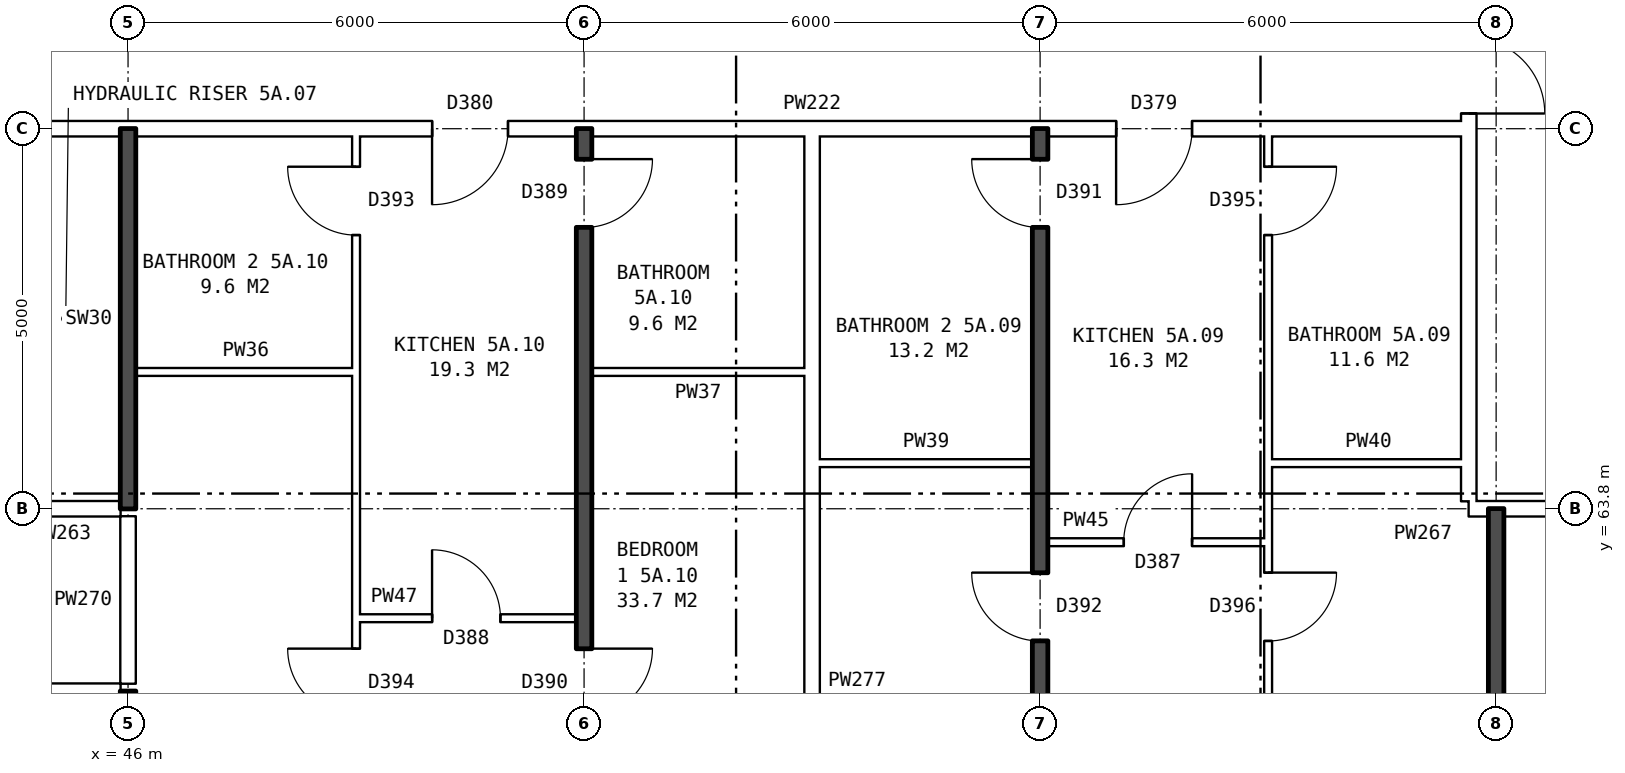
"""IFC4 building model, lengths in metres.
Left out: names, types, materials, properties, quantities, classifications, styles, units other than length and angle.
Written with IfcOpenShell. Run it as: python <this file> out.ifc"""

import sys

from ifc_helpers import new_model, si_unit, direction, frame, frame_2d, origin, place, context, subcontext, project, spatial, rectangle, extrude, element, fill, save


model = new_model("IFC4")
c1 = context("Model", 3, precision=1e-05, world=origin(), true_north=direction((0.0, 1.0)))
c2 = subcontext(c1, "Body", "Model", "MODEL_VIEW")
j1 = project(units=[si_unit("LENGTHUNIT", "METRE"), si_unit("PLANEANGLEUNIT", "RADIAN")], contexts=[c1])
p1 = place(None, origin())
s1 = spatial("IfcSite", under=j1, at=p1, CompositionType="ELEMENT")
p2 = place(p1, origin())
s2 = spatial("IfcBuilding", under=s1, at=p2, CompositionType="ELEMENT")
p3 = place(p2, frame((0.0, 0.0, 22.6)))
s3 = spatial("IfcBuildingStorey", under=s2, at=p3, CompositionType="ELEMENT", Elevation=22.6)
p4 = place(p3, frame((63.64, 63.9, 0.0), z_axis=(0.0, 0.0, 1.0), x_axis=(0.0, 1.0, 0.0)))
e1 = element("IfcWall", 1, at=p4, inside=s3, PredefinedType="PARTITIONING", context=c2, shape_type="SweptSolid", body=[
    extrude(rectangle(XDim=12.2, YDim=0.2, at=frame_2d((6.1, 0.0))), origin(), (0.0, 0.0, 1.0), 2.85),
])
p5 = place(p4, frame((5.1, 0.0, 0.0)))
e2 = element("IfcOpeningElement", 2, at=p5, cuts=e1, PredefinedType="OPENING", context=c2, shape_type="SweptSolid", body=[
    extrude(rectangle(XDim=2.0, YDim=2.1, at=frame_2d((1.0, 1.05))), frame((0.0, 0.11, 0.0), z_axis=(0.0, -1.0, 0.0), x_axis=(1.0, 0.0, 0.0)), (0.0, 0.0, 1.0), 0.22),
])
p6 = place(p3, frame((20.11, 61.4, 0.0), z_axis=(0.0, 0.0, 1.0), x_axis=(1.0, 0.0, 0.0)))
e3 = element("IfcWall", 3, at=p6, inside=s3, PredefinedType="PARTITIONING", context=c2, shape_type="SweptSolid", body=[
    extrude(rectangle(XDim=25.79, YDim=0.2, at=frame_2d((12.895, 0.0))), origin(), (0.0, 0.0, 1.0), 2.85),
])
p7 = place(p6, frame((22.34, 0.0, 0.0)))
e4 = element("IfcOpeningElement", 4, at=p7, cuts=e3, PredefinedType="OPENING", context=c2, shape_type="SweptSolid", body=[
    extrude(rectangle(XDim=1.0, YDim=2.1, at=frame_2d((0.5, 1.05))), frame((0.0, 0.11, 0.0), z_axis=(0.0, -1.0, 0.0), x_axis=(1.0, 0.0, 0.0)), (0.0, 0.0, 1.0), 0.22),
])
p8 = place(p6, frame((10.39, 0.0, 0.0)))
e5 = element("IfcOpeningElement", 5, at=p8, cuts=e3, PredefinedType="OPENING", context=c2, shape_type="SweptSolid", body=[
    extrude(rectangle(XDim=1.0, YDim=2.1, at=frame_2d((0.5, 1.05))), frame((0.0, 0.11, 0.0), z_axis=(0.0, -1.0, 0.0), x_axis=(1.0, 0.0, 0.0)), (0.0, 0.0, 1.0), 0.22),
])
p9 = place(p6, frame((2.245, 0.0, 0.0)))
e6 = element("IfcOpeningElement", 6, at=p9, cuts=e3, PredefinedType="OPENING", context=c2, shape_type="SweptSolid", body=[
    extrude(rectangle(XDim=1.0, YDim=2.1, at=frame_2d((0.5, 1.05))), frame((0.0, 0.11, 0.0), z_axis=(0.0, -1.0, 0.0), x_axis=(1.0, 0.0, 0.0)), (0.0, 0.0, 1.0), 0.22),
])
p10 = place(p3, frame((49.0, 62.36, 0.0), z_axis=(0.0, 0.0, 1.0), x_axis=(1.0, 0.0, 0.0)))
e7 = element("IfcWall", 7, at=p10, inside=s3, PredefinedType="PARTITIONING", context=c2, shape_type="SweptSolid", body=[
    extrude(rectangle(XDim=2.9, YDim=0.1, at=frame_2d((1.45, 0.0))), origin(), (0.0, 0.0, 1.0), 2.85),
])
p11 = place(p10, frame((1.0, 0.0, 0.0)))
e8 = element("IfcOpeningElement", 8, at=p11, cuts=e7, PredefinedType="OPENING", context=c2, shape_type="SweptSolid", body=[
    extrude(rectangle(XDim=0.9, YDim=2.1, at=frame_2d((0.45, 1.05))), frame((0.0, 0.06, 0.0), z_axis=(0.0, -1.0, 0.0), x_axis=(1.0, 0.0, 0.0)), (0.0, 0.0, 1.0), 0.12),
])
p12 = place(p3, frame((58.1, 63.36, 0.0), z_axis=(0.0, 0.0, 1.0), x_axis=(1.0, 0.0, 0.0)))
e9 = element("IfcWall", 9, at=p12, inside=s3, PredefinedType="PARTITIONING", context=c2, shape_type="SweptSolid", body=[
    extrude(rectangle(XDim=2.9, YDim=0.1, at=frame_2d((1.45, 0.0))), origin(), (0.0, 0.0, 1.0), 2.85),
])
p13 = place(p12, frame((1.0, 0.0, 0.0)))
e10 = element("IfcOpeningElement", 10, at=p13, cuts=e9, PredefinedType="OPENING", context=c2, shape_type="SweptSolid", body=[
    extrude(rectangle(XDim=0.9, YDim=2.1, at=frame_2d((0.45, 1.05))), frame((0.0, 0.06, 0.0), z_axis=(0.0, -1.0, 0.0), x_axis=(1.0, 0.0, 0.0)), (0.0, 0.0, 1.0), 0.12),
])
p14 = place(p3, frame((44.36, 63.8, 0.0), z_axis=(0.0, 0.0, 1.0), x_axis=(1.0, 0.0, 0.0)))
e11 = element("IfcWall", 11, at=p14, inside=s3, PredefinedType="PARTITIONING", context=c2, shape_type="SweptSolid", body=[
    extrude(rectangle(XDim=1.54, YDim=0.2, at=frame_2d((0.77, 0.0))), origin(), (0.0, 0.0, 1.0), 2.85),
])
p15 = place(p3, frame((63.64, 63.8, 0.0), z_axis=(0.0, 0.0, 1.0), x_axis=(1.0, 0.0, 0.0)))
e12 = element("IfcWall", 12, at=p15, inside=s3, PredefinedType="PARTITIONING", context=c2, shape_type="SweptSolid", body=[
    extrude(rectangle(XDim=3.0, YDim=0.2, at=frame_2d((1.5, 0.0))), origin(), (0.0, 0.0, 1.0), 2.85),
])
p16 = place(p15, frame((1.18, 0.0, 0.0)))
e13 = element("IfcOpeningElement", 13, at=p16, cuts=e12, PredefinedType="OPENING", context=c2, shape_type="SweptSolid", body=[
    extrude(rectangle(XDim=1.0, YDim=2.1, at=frame_2d((0.5, 1.05))), frame((0.0, 0.11, 0.0), z_axis=(0.0, -1.0, 0.0), x_axis=(1.0, 0.0, 0.0)), (0.0, 0.0, 1.0), 0.22),
])
p17 = place(p3, frame((55.1, 64.4, 0.0), z_axis=(0.0, 0.0, 1.0), x_axis=(1.0, 0.0, 0.0)))
e14 = element("IfcWall", 14, at=p17, inside=s3, PredefinedType="PARTITIONING", context=c2, shape_type="SweptSolid", body=[
    extrude(rectangle(XDim=2.8, YDim=0.1, at=frame_2d((1.4, 0.0))), origin(), (0.0, 0.0, 1.0), 2.85),
])
p18 = place(p3, frame((61.0, 64.4, 0.0), z_axis=(0.0, 0.0, 1.0), x_axis=(1.0, 0.0, 0.0)))
e15 = element("IfcWall", 15, at=p18, inside=s3, PredefinedType="PARTITIONING", context=c2, shape_type="SweptSolid", body=[
    extrude(rectangle(XDim=2.64, YDim=0.1, at=frame_2d((1.32, 0.0))), origin(), (0.0, 0.0, 1.0), 2.85),
])
p19 = place(p3, frame((46.1, 65.6, 0.0), z_axis=(0.0, 0.0, 1.0), x_axis=(1.0, 0.0, 0.0)))
e16 = element("IfcWall", 16, at=p19, inside=s3, PredefinedType="PARTITIONING", context=c2, shape_type="SweptSolid", body=[
    extrude(rectangle(XDim=2.9, YDim=0.1, at=frame_2d((1.45, 0.0))), origin(), (0.0, 0.0, 1.0), 2.85),
])
p20 = place(p3, frame((52.1, 65.6, 0.0), z_axis=(0.0, 0.0, 1.0), x_axis=(1.0, 0.0, 0.0)))
e17 = element("IfcWall", 17, at=p20, inside=s3, PredefinedType="PARTITIONING", context=c2, shape_type="SweptSolid", body=[
    extrude(rectangle(XDim=2.8, YDim=0.1, at=frame_2d((1.4, 0.0))), origin(), (0.0, 0.0, 1.0), 2.85),
])
p21 = place(p3, frame((44.36, 68.8, 0.0), z_axis=(0.0, 0.0, 1.0), x_axis=(1.0, 0.0, 0.0)))
e18 = element("IfcWall", 18, at=p21, inside=s3, PredefinedType="PARTITIONING", context=c2, shape_type="SweptSolid", body=[
    extrude(rectangle(XDim=19.28, YDim=0.2, at=frame_2d((9.64, 0.0))), origin(), (0.0, 0.0, 1.0), 2.85),
])
p22 = place(p21, frame((14.64, 0.0, 0.0)))
e19 = element("IfcOpeningElement", 19, at=p22, cuts=e18, PredefinedType="OPENING", context=c2, shape_type="SweptSolid", body=[
    extrude(rectangle(XDim=1.0, YDim=2.1, at=frame_2d((0.5, 1.05))), frame((0.0, 0.11, 0.0), z_axis=(0.0, -1.0, 0.0), x_axis=(1.0, 0.0, 0.0)), (0.0, 0.0, 1.0), 0.22),
])
p23 = place(p21, frame((5.64, 0.0, 0.0)))
e20 = element("IfcOpeningElement", 20, at=p23, cuts=e18, PredefinedType="OPENING", context=c2, shape_type="SweptSolid", body=[
    extrude(rectangle(XDim=1.0, YDim=2.1, at=frame_2d((0.5, 1.05))), frame((0.0, 0.11, 0.0), z_axis=(0.0, -1.0, 0.0), x_axis=(1.0, 0.0, 0.0)), (0.0, 0.0, 1.0), 0.22),
])
p24 = place(p3, frame((46.0, 54.36, 0.0), z_axis=(0.0, 0.0, 1.0), x_axis=(0.0, 1.0, 0.0)))
e21 = element("IfcWall", 21, at=p24, inside=s3, PredefinedType="SOLIDWALL", context=c2, shape_type="SweptSolid", body=[
    extrude(rectangle(XDim=7.04, YDim=0.2, at=frame_2d((3.52, 0.0))), origin(), (0.0, 0.0, 1.0), 2.85),
])
p25 = place(p3, frame((46.0, 61.5, 0.0), z_axis=(0.0, 0.0, 1.0), x_axis=(0.0, 1.0, 0.0)))
e22 = element("IfcWall", 22, at=p25, inside=s3, PredefinedType="PARTITIONING", context=c2, shape_type="SweptSolid", body=[
    extrude(rectangle(XDim=2.2, YDim=0.2, at=frame_2d((1.1, 0.0))), origin(), (0.0, 0.0, 1.0), 2.85),
])
p26 = place(p3, frame((46.0, 63.8, 0.0), z_axis=(0.0, 0.0, 1.0), x_axis=(0.0, 1.0, 0.0)))
e23 = element("IfcWall", 23, at=p26, inside=s3, PredefinedType="SOLIDWALL", context=c2, shape_type="SweptSolid", body=[
    extrude(rectangle(XDim=5.0, YDim=0.2, at=frame_2d((2.5, 0.0))), origin(), (0.0, 0.0, 1.0), 2.85),
])
p27 = place(p3, frame((49.0, 54.36, 0.0), z_axis=(0.0, 0.0, 1.0), x_axis=(0.0, 1.0, 0.0)))
e24 = element("IfcWall", 24, at=p27, inside=s3, PredefinedType="PARTITIONING", context=c2, shape_type="SweptSolid", body=[
    extrude(rectangle(XDim=14.34, YDim=0.1, at=frame_2d((7.17, 0.0))), origin(), (0.0, 0.0, 1.0), 2.85),
])
p28 = place(p27, frame((6.7, 0.0, 0.0)))
e25 = element("IfcOpeningElement", 25, at=p28, cuts=e24, PredefinedType="OPENING", context=c2, shape_type="SweptSolid", body=[
    extrude(rectangle(XDim=0.9, YDim=2.1, at=frame_2d((0.45, 1.05))), frame((0.0, 0.06, 0.0), z_axis=(0.0, -1.0, 0.0), x_axis=(1.0, 0.0, 0.0)), (0.0, 0.0, 1.0), 0.12),
])
p29 = place(p27, frame((13.04, 0.0, 0.0)))
e26 = element("IfcOpeningElement", 26, at=p29, cuts=e24, PredefinedType="OPENING", context=c2, shape_type="SweptSolid", body=[
    extrude(rectangle(XDim=0.9, YDim=2.1, at=frame_2d((0.45, 1.05))), frame((0.0, 0.06, 0.0), z_axis=(0.0, -1.0, 0.0), x_axis=(1.0, 0.0, 0.0)), (0.0, 0.0, 1.0), 0.12),
])
p30 = place(p3, frame((52.0, 54.36, 0.0), z_axis=(0.0, 0.0, 1.0), x_axis=(0.0, 1.0, 0.0)))
e27 = element("IfcWall", 27, at=p30, inside=s3, PredefinedType="SOLIDWALL", context=c2, shape_type="SweptSolid", body=[
    extrude(rectangle(XDim=14.44, YDim=0.2, at=frame_2d((7.22, 0.0))), origin(), (0.0, 0.0, 1.0), 2.85),
])
p31 = place(p30, frame((6.7, 0.0, 0.0)))
e28 = element("IfcOpeningElement", 28, at=p31, cuts=e27, PredefinedType="OPENING", context=c2, shape_type="SweptSolid", body=[
    extrude(rectangle(XDim=0.9, YDim=2.1, at=frame_2d((0.45, 1.05))), frame((0.0, 0.11, 0.0), z_axis=(0.0, -1.0, 0.0), x_axis=(1.0, 0.0, 0.0)), (0.0, 0.0, 1.0), 0.22),
])
p32 = place(p30, frame((13.14, 0.0, 0.0)))
e29 = element("IfcOpeningElement", 29, at=p32, cuts=e27, PredefinedType="OPENING", context=c2, shape_type="SweptSolid", body=[
    extrude(rectangle(XDim=0.9, YDim=2.1, at=frame_2d((0.45, 1.05))), frame((0.0, 0.11, 0.0), z_axis=(0.0, -1.0, 0.0), x_axis=(1.0, 0.0, 0.0)), (0.0, 0.0, 1.0), 0.22),
])
p33 = place(p3, frame((55.0, 54.36, 0.0), z_axis=(0.0, 0.0, 1.0), x_axis=(0.0, 1.0, 0.0)))
e30 = element("IfcWall", 30, at=p33, inside=s3, PredefinedType="PARTITIONING", context=c2, shape_type="SweptSolid", body=[
    extrude(rectangle(XDim=14.34, YDim=0.2, at=frame_2d((7.17, 0.0))), origin(), (0.0, 0.0, 1.0), 2.85),
])
p34 = place(p3, frame((58.0, 54.36, 0.0), z_axis=(0.0, 0.0, 1.0), x_axis=(0.0, 1.0, 0.0)))
e31 = element("IfcWall", 31, at=p34, inside=s3, PredefinedType="SOLIDWALL", context=c2, shape_type="SweptSolid", body=[
    extrude(rectangle(XDim=14.44, YDim=0.2, at=frame_2d((7.22, 0.0))), origin(), (0.0, 0.0, 1.0), 2.85),
])
p35 = place(p34, frame((7.7, 0.0, 0.0)))
e32 = element("IfcOpeningElement", 32, at=p35, cuts=e31, PredefinedType="OPENING", context=c2, shape_type="SweptSolid", body=[
    extrude(rectangle(XDim=0.9, YDim=2.1, at=frame_2d((0.45, 1.05))), frame((0.0, 0.11, 0.0), z_axis=(0.0, -1.0, 0.0), x_axis=(1.0, 0.0, 0.0)), (0.0, 0.0, 1.0), 0.22),
])
p36 = place(p34, frame((13.14, 0.0, 0.0)))
e33 = element("IfcOpeningElement", 33, at=p36, cuts=e31, PredefinedType="OPENING", context=c2, shape_type="SweptSolid", body=[
    extrude(rectangle(XDim=0.9, YDim=2.1, at=frame_2d((0.45, 1.05))), frame((0.0, 0.11, 0.0), z_axis=(0.0, -1.0, 0.0), x_axis=(1.0, 0.0, 0.0)), (0.0, 0.0, 1.0), 0.22),
])
p37 = place(p3, frame((61.0, 54.36, 0.0), z_axis=(0.0, 0.0, 1.0), x_axis=(0.0, 1.0, 0.0)))
e34 = element("IfcWall", 34, at=p37, inside=s3, PredefinedType="PARTITIONING", context=c2, shape_type="SweptSolid", body=[
    extrude(rectangle(XDim=14.34, YDim=0.1, at=frame_2d((7.17, 0.0))), origin(), (0.0, 0.0, 1.0), 2.85),
])
p38 = place(p37, frame((7.7, 0.0, 0.0)))
e35 = element("IfcOpeningElement", 35, at=p38, cuts=e34, PredefinedType="OPENING", context=c2, shape_type="SweptSolid", body=[
    extrude(rectangle(XDim=0.9, YDim=2.1, at=frame_2d((0.45, 1.05))), frame((0.0, 0.06, 0.0), z_axis=(0.0, -1.0, 0.0), x_axis=(1.0, 0.0, 0.0)), (0.0, 0.0, 1.0), 0.12),
])
p39 = place(p37, frame((13.04, 0.0, 0.0)))
e36 = element("IfcOpeningElement", 36, at=p39, cuts=e34, PredefinedType="OPENING", context=c2, shape_type="SweptSolid", body=[
    extrude(rectangle(XDim=0.9, YDim=2.1, at=frame_2d((0.45, 1.05))), frame((0.0, 0.06, 0.0), z_axis=(0.0, -1.0, 0.0), x_axis=(1.0, 0.0, 0.0)), (0.0, 0.0, 1.0), 0.12),
])
p40 = place(p3, frame((64.0, 54.36, 0.0), z_axis=(0.0, 0.0, 1.0), x_axis=(0.0, 1.0, 0.0)))
e37 = element("IfcWall", 37, at=p40, inside=s3, PredefinedType="SOLIDWALL", context=c2, shape_type="SweptSolid", body=[
    extrude(rectangle(XDim=9.44, YDim=0.2, at=frame_2d((4.72, 0.0))), origin(), (0.0, 0.0, 1.0), 2.85),
])
p41 = place(p5, frame((2.0, 0.0, 0.0), z_axis=(0.0, 0.0, 1.0), x_axis=(-1.0, 0.0, 0.0)))
e38 = element("IfcDoor", 38, at=p41, inside=s3, OperationType="DOUBLE_DOOR_SINGLE_SWING", PredefinedType="DOOR", context=c2, shape_type="SweptSolid", body=[
    extrude(rectangle(XDim=2.0, YDim=2.1, at=frame_2d((1.0, 1.05))), frame((0.0, 0.025, 0.0), z_axis=(0.0, -1.0, 0.0), x_axis=(1.0, 0.0, 0.0)), (0.0, 0.0, 1.0), 0.05),
])
fill(e2, e38)
p42 = place(p38, frame((0.9, 0.0, 0.0), z_axis=(0.0, 0.0, 1.0), x_axis=(-1.0, 0.0, 0.0)))
e39 = element("IfcDoor", 39, at=p42, inside=s3, OperationType="SINGLE_SWING_LEFT", PredefinedType="DOOR", context=c2, shape_type="SweptSolid", body=[
    extrude(rectangle(XDim=0.9, YDim=2.1, at=frame_2d((0.45, 1.05))), frame((0.0, 0.025, 0.0), z_axis=(0.0, -1.0, 0.0), x_axis=(1.0, 0.0, 0.0)), (0.0, 0.0, 1.0), 0.05),
])
fill(e35, e39)
p43 = place(p35, origin())
e40 = element("IfcDoor", 40, at=p43, inside=s3, OperationType="SINGLE_SWING_RIGHT", PredefinedType="DOOR", context=c2, shape_type="SweptSolid", body=[
    extrude(rectangle(XDim=0.9, YDim=2.1, at=frame_2d((0.45, 1.05))), frame((0.0, 0.025, 0.0), z_axis=(0.0, -1.0, 0.0), x_axis=(1.0, 0.0, 0.0)), (0.0, 0.0, 1.0), 0.05),
])
fill(e32, e40)
p44 = place(p22, frame((1.0, 0.0, 0.0), z_axis=(0.0, 0.0, 1.0), x_axis=(-1.0, 0.0, 0.0)))
e41 = element("IfcDoor", 41, at=p44, inside=s3, OperationType="SINGLE_SWING_RIGHT", PredefinedType="DOOR", context=c2, shape_type="SweptSolid", body=[
    extrude(rectangle(XDim=1.0, YDim=2.1, at=frame_2d((0.5, 1.05))), frame((0.0, 0.025, 0.0), z_axis=(0.0, -1.0, 0.0), x_axis=(1.0, 0.0, 0.0)), (0.0, 0.0, 1.0), 0.05),
])
fill(e19, e41)
p45 = place(p13, origin())
e42 = element("IfcDoor", 42, at=p45, inside=s3, OperationType="SINGLE_SWING_RIGHT", PredefinedType="DOOR", context=c2, shape_type="SweptSolid", body=[
    extrude(rectangle(XDim=0.9, YDim=2.1, at=frame_2d((0.45, 1.05))), frame((0.0, 0.025, 0.0), z_axis=(0.0, -1.0, 0.0), x_axis=(1.0, 0.0, 0.0)), (0.0, 0.0, 1.0), 0.05),
])
fill(e10, e42)
p46 = place(p39, frame((0.9, 0.0, 0.0), z_axis=(0.0, 0.0, 1.0), x_axis=(-1.0, 0.0, 0.0)))
e43 = element("IfcDoor", 43, at=p46, inside=s3, OperationType="SINGLE_SWING_LEFT", PredefinedType="DOOR", context=c2, shape_type="SweptSolid", body=[
    extrude(rectangle(XDim=0.9, YDim=2.1, at=frame_2d((0.45, 1.05))), frame((0.0, 0.025, 0.0), z_axis=(0.0, -1.0, 0.0), x_axis=(1.0, 0.0, 0.0)), (0.0, 0.0, 1.0), 0.05),
])
fill(e36, e43)
p47 = place(p36, origin())
e44 = element("IfcDoor", 44, at=p47, inside=s3, OperationType="SINGLE_SWING_RIGHT", PredefinedType="DOOR", context=c2, shape_type="SweptSolid", body=[
    extrude(rectangle(XDim=0.9, YDim=2.1, at=frame_2d((0.45, 1.05))), frame((0.0, 0.025, 0.0), z_axis=(0.0, -1.0, 0.0), x_axis=(1.0, 0.0, 0.0)), (0.0, 0.0, 1.0), 0.05),
])
fill(e33, e44)
p48 = place(p31, frame((0.9, 0.0, 0.0), z_axis=(0.0, 0.0, 1.0), x_axis=(-1.0, 0.0, 0.0)))
e45 = element("IfcDoor", 45, at=p48, inside=s3, OperationType="SINGLE_SWING_LEFT", PredefinedType="DOOR", context=c2, shape_type="SweptSolid", body=[
    extrude(rectangle(XDim=0.9, YDim=2.1, at=frame_2d((0.45, 1.05))), frame((0.0, 0.025, 0.0), z_axis=(0.0, -1.0, 0.0), x_axis=(1.0, 0.0, 0.0)), (0.0, 0.0, 1.0), 0.05),
])
fill(e28, e45)
p49 = place(p28, origin())
e46 = element("IfcDoor", 46, at=p49, inside=s3, OperationType="SINGLE_SWING_RIGHT", PredefinedType="DOOR", context=c2, shape_type="SweptSolid", body=[
    extrude(rectangle(XDim=0.9, YDim=2.1, at=frame_2d((0.45, 1.05))), frame((0.0, 0.025, 0.0), z_axis=(0.0, -1.0, 0.0), x_axis=(1.0, 0.0, 0.0)), (0.0, 0.0, 1.0), 0.05),
])
fill(e25, e46)
p50 = place(p23, frame((1.0, 0.0, 0.0), z_axis=(0.0, 0.0, 1.0), x_axis=(-1.0, 0.0, 0.0)))
e47 = element("IfcDoor", 47, at=p50, inside=s3, OperationType="SINGLE_SWING_RIGHT", PredefinedType="DOOR", context=c2, shape_type="SweptSolid", body=[
    extrude(rectangle(XDim=1.0, YDim=2.1, at=frame_2d((0.5, 1.05))), frame((0.0, 0.025, 0.0), z_axis=(0.0, -1.0, 0.0), x_axis=(1.0, 0.0, 0.0)), (0.0, 0.0, 1.0), 0.05),
])
fill(e20, e47)
p51 = place(p11, origin())
e48 = element("IfcDoor", 48, at=p51, inside=s3, OperationType="SINGLE_SWING_LEFT", PredefinedType="DOOR", context=c2, shape_type="SweptSolid", body=[
    extrude(rectangle(XDim=0.9, YDim=2.1, at=frame_2d((0.45, 1.05))), frame((0.0, 0.025, 0.0), z_axis=(0.0, -1.0, 0.0), x_axis=(1.0, 0.0, 0.0)), (0.0, 0.0, 1.0), 0.05),
])
fill(e8, e48)
p52 = place(p32, frame((0.9, 0.0, 0.0), z_axis=(0.0, 0.0, 1.0), x_axis=(-1.0, 0.0, 0.0)))
e49 = element("IfcDoor", 49, at=p52, inside=s3, OperationType="SINGLE_SWING_LEFT", PredefinedType="DOOR", context=c2, shape_type="SweptSolid", body=[
    extrude(rectangle(XDim=0.9, YDim=2.1, at=frame_2d((0.45, 1.05))), frame((0.0, 0.025, 0.0), z_axis=(0.0, -1.0, 0.0), x_axis=(1.0, 0.0, 0.0)), (0.0, 0.0, 1.0), 0.05),
])
fill(e29, e49)
p53 = place(p29, origin())
e50 = element("IfcDoor", 50, at=p53, inside=s3, OperationType="SINGLE_SWING_RIGHT", PredefinedType="DOOR", context=c2, shape_type="SweptSolid", body=[
    extrude(rectangle(XDim=0.9, YDim=2.1, at=frame_2d((0.45, 1.05))), frame((0.0, 0.025, 0.0), z_axis=(0.0, -1.0, 0.0), x_axis=(1.0, 0.0, 0.0)), (0.0, 0.0, 1.0), 0.05),
])
fill(e26, e50)
save(model, sys.argv[1])
